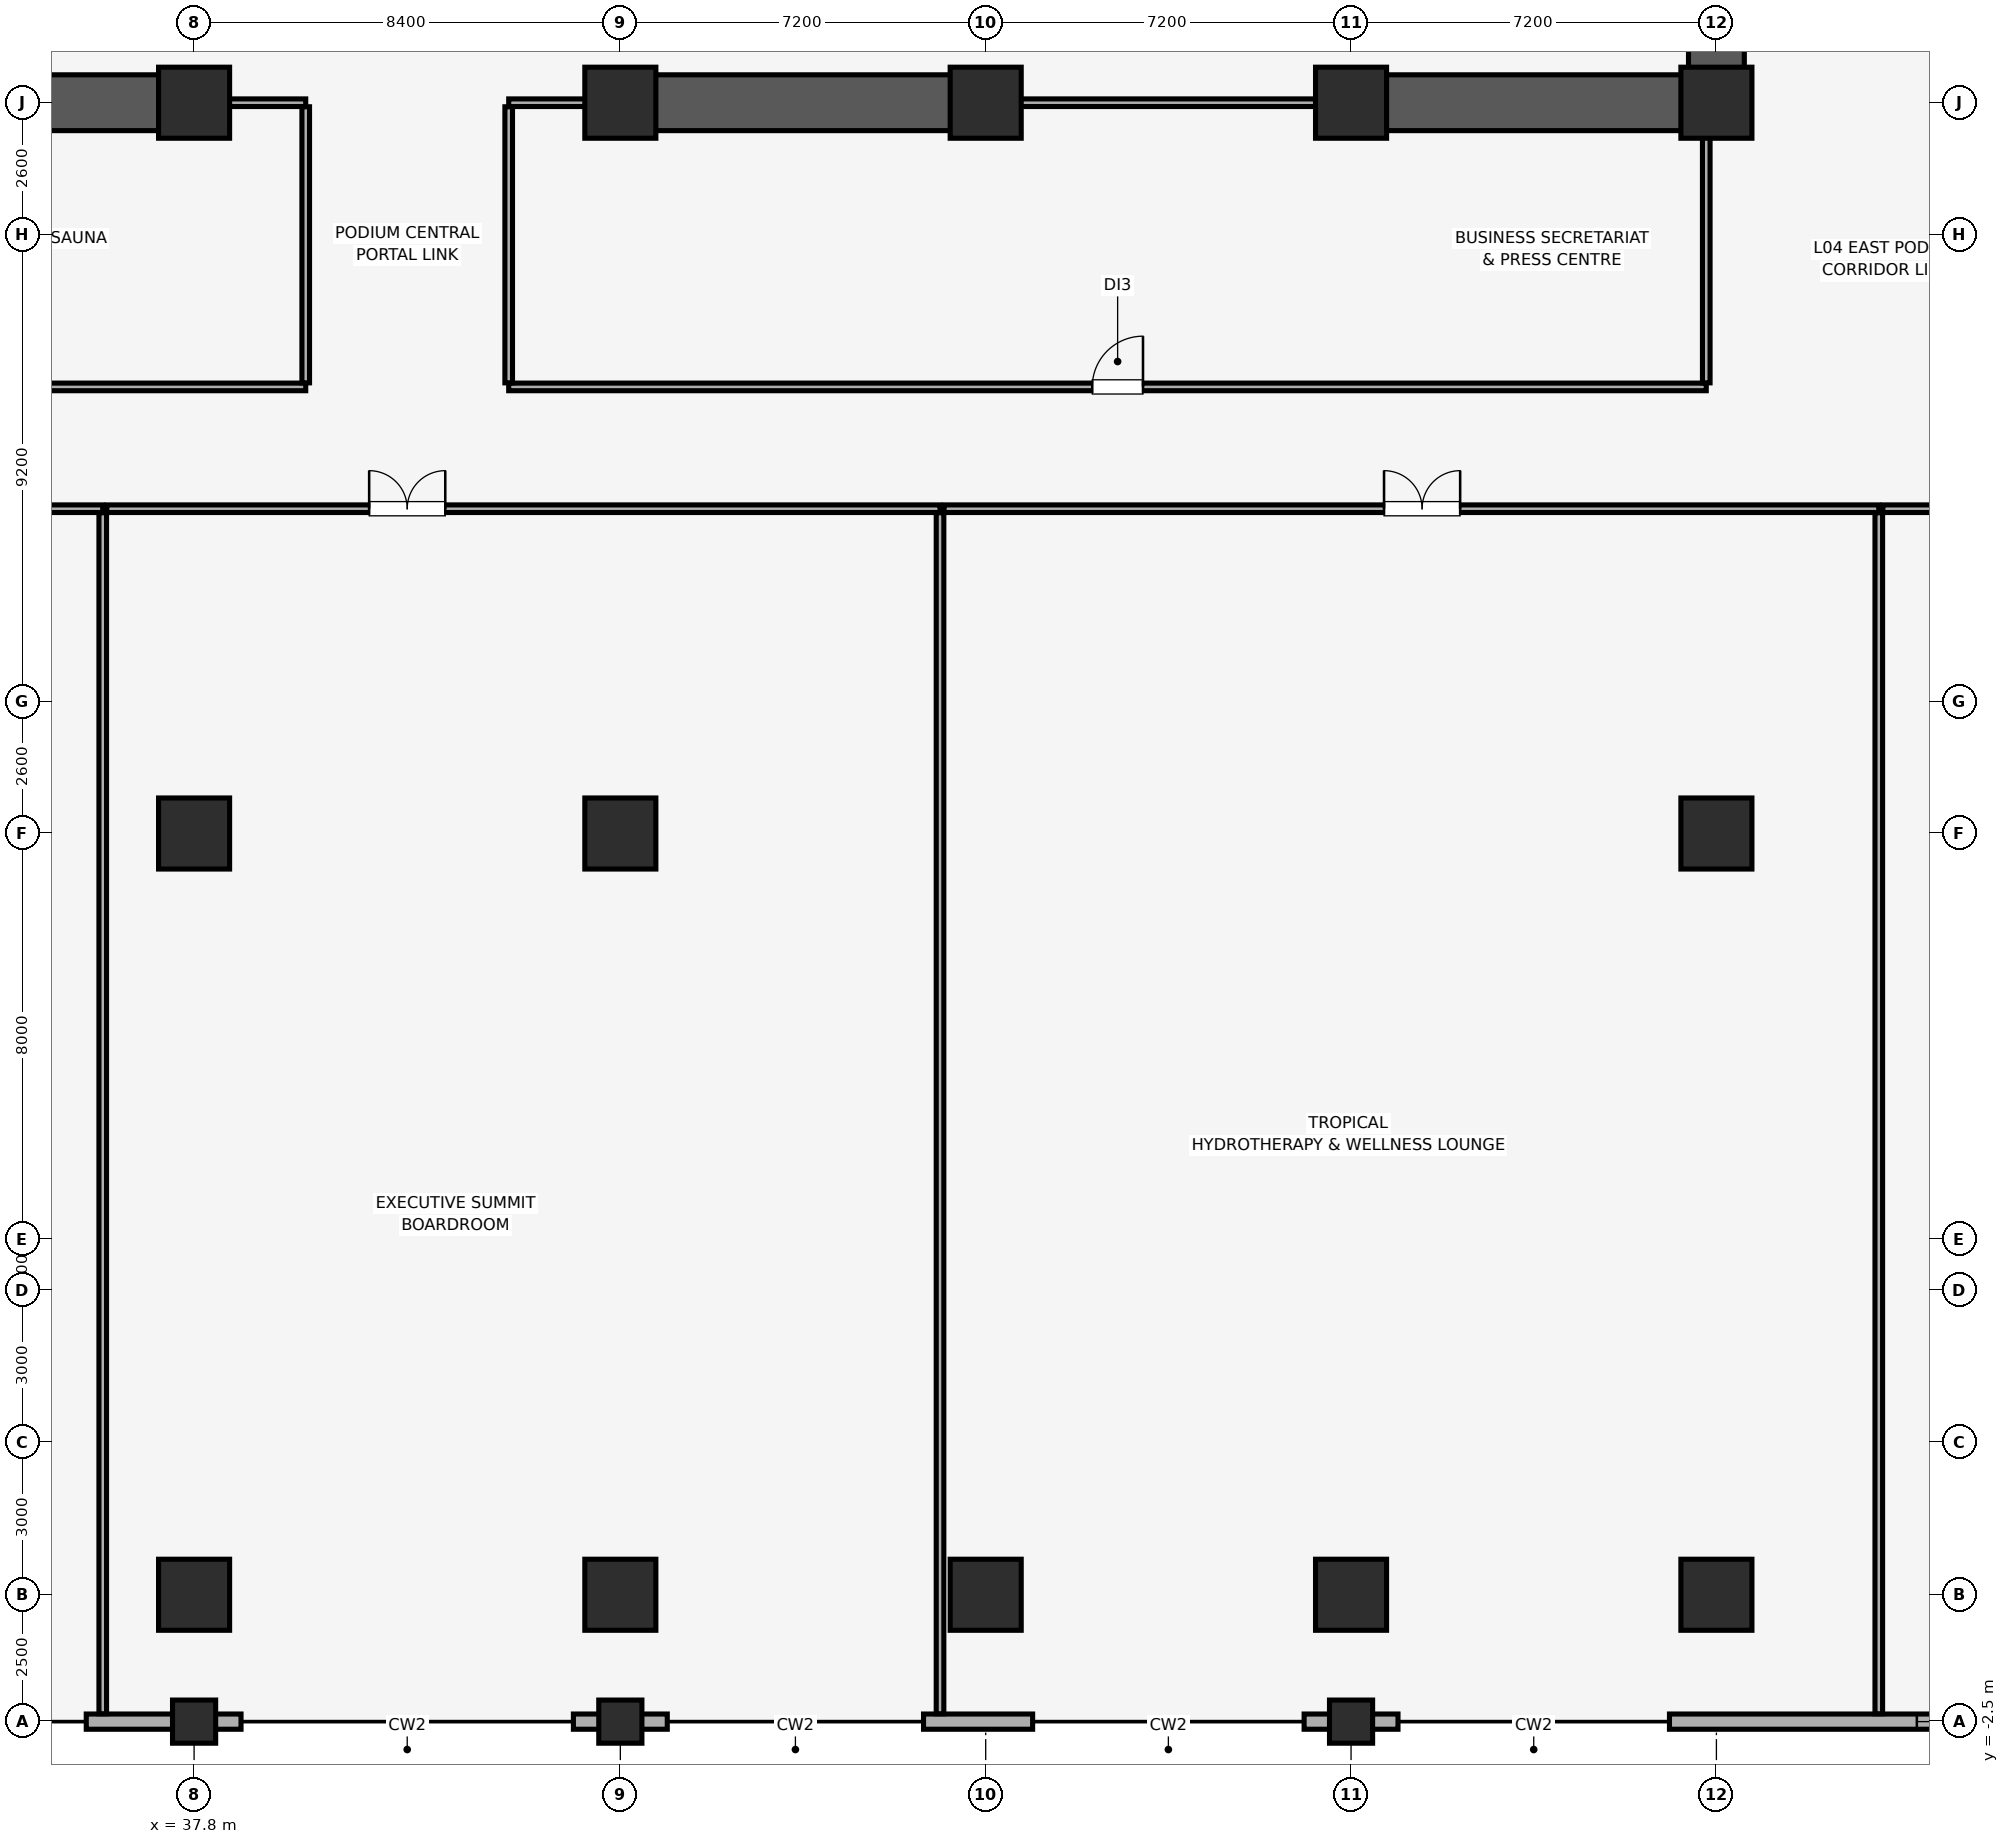
"""IFC4 building model, lengths in metres.
Left out: names, types, materials, properties, quantities, classifications, styles, units other than length and angle.
Written with IfcOpenShell. Run it as: python <this file> out.ifc"""

import sys

from ifc_helpers import new_model, si_unit, direction, frame, frame_2d, origin, origin_2d, place, context, subcontext, project, spatial, rectangle, extrude, element, fill, save


model = new_model("IFC4")
c1 = context("Model", 3, precision=1e-05, world=origin(), true_north=direction((0.0, 1.0)))
c2 = subcontext(c1, "Body", "Model", "MODEL_VIEW")
j1 = project(units=[si_unit("LENGTHUNIT", "METRE"), si_unit("PLANEANGLEUNIT", "RADIAN")], contexts=[c1])
p1 = place(None, origin())
s1 = spatial("IfcSite", under=j1, at=p1, CompositionType="ELEMENT")
p2 = place(p1, origin())
s2 = spatial("IfcBuilding", under=s1, at=p2, CompositionType="ELEMENT")
p3 = place(p2, frame((0.0, 0.0, 26.0)))
s3 = spatial("IfcBuildingStorey", under=s2, at=p3, CompositionType="ELEMENT", Elevation=26.0)
for number, where, z_axis, x_axis in (
    (1, (37.8, -2.5, 0.0), (0.0, 0.0, 1.0), (1.0, 0.0, 0.0)),
    (2, (46.2, -2.5, 0.0), (0.0, 0.0, 1.0), (1.0, 0.0, 0.0)),
    (3, (60.6, -2.5, 0.0), (0.0, 0.0, 1.0), (1.0, 0.0, 0.0)),
):
    element("IfcColumn", number, at=place(p3, frame(where, z_axis=z_axis, x_axis=x_axis)), inside=s3, PredefinedType="COLUMN", context=c2, shape_type="SweptSolid", body=[
        extrude(rectangle(XDim=0.85, YDim=0.85, at=origin_2d()), origin(), (0.0, 0.0, 1.0), 5.16),
    ])
for number, where, z_axis, x_axis in (
    (4, (37.8, 0.0, 0.0), (0.0, 0.0, 1.0), (1.0, 0.0, 0.0)),
    (5, (37.8, 29.4, 0.0), (0.0, 0.0, 1.0), (1.0, 0.0, 0.0)),
    (6, (46.2, 0.0, 0.0), (0.0, 0.0, 1.0), (1.0, 0.0, 0.0)),
    (7, (46.2, 29.4, 0.0), (0.0, 0.0, 1.0), (1.0, 0.0, 0.0)),
    (8, (53.4, 0.0, 0.0), (0.0, 0.0, 1.0), (1.0, 0.0, 0.0)),
    (9, (53.4, 29.4, 0.0), (0.0, 0.0, 1.0), (1.0, 0.0, 0.0)),
    (10, (60.6, 0.0, 0.0), (0.0, 0.0, 1.0), (1.0, 0.0, 0.0)),
    (11, (60.6, 29.4, 0.0), (0.0, 0.0, 1.0), (1.0, 0.0, 0.0)),
    (12, (67.8, 0.0, 0.0), (0.0, 0.0, 1.0), (1.0, 0.0, 0.0)),
    (13, (67.8, 29.4, 0.0), (0.0, 0.0, 1.0), (1.0, 0.0, 0.0)),
    (14, (37.8, 15.0, 0.0), (0.0, 0.0, 1.0), (1.0, 0.0, 0.0)),
    (15, (46.2, 15.0, 0.0), (0.0, 0.0, 1.0), (1.0, 0.0, 0.0)),
    (16, (67.8, 15.0, 0.0), (0.0, 0.0, 1.0), (1.0, 0.0, 0.0)),
):
    element("IfcColumn", number, at=place(p3, frame(where, z_axis=z_axis, x_axis=x_axis)), inside=s3, PredefinedType="COLUMN", context=c2, shape_type="SweptSolid", body=[
        extrude(rectangle(XDim=1.4, YDim=1.4, at=origin_2d()), origin(), (0.0, 0.0, 1.0), 5.16),
    ])
p4 = place(p3, frame((35.675, -2.5, 0.0), z_axis=(0.0, 0.0, 1.0), x_axis=(1.0, 0.0, 0.0)))
e17 = element("IfcWall", 17, at=p4, inside=s3, PredefinedType="SOLIDWALL", context=c2, shape_type="SweptSolid", body=[
    extrude(rectangle(XDim=3.05, YDim=0.3, at=frame_2d((1.525, 0.0))), origin(), (0.0, 0.0, 1.0), 5.12),
])
p5 = place(p3, frame((45.275, -2.5, 0.0), z_axis=(0.0, 0.0, 1.0), x_axis=(1.0, 0.0, 0.0)))
e18 = element("IfcWall", 18, at=p5, inside=s3, PredefinedType="SOLIDWALL", context=c2, shape_type="SweptSolid", body=[
    extrude(rectangle(XDim=1.85, YDim=0.3, at=frame_2d((0.925, 0.0))), origin(), (0.0, 0.0, 1.0), 5.12),
])
p6 = place(p3, frame((52.175, -2.5, 0.0), z_axis=(0.0, 0.0, 1.0), x_axis=(1.0, 0.0, 0.0)))
e19 = element("IfcWall", 19, at=p6, inside=s3, PredefinedType="SOLIDWALL", context=c2, shape_type="SweptSolid", body=[
    extrude(rectangle(XDim=2.15, YDim=0.3, at=frame_2d((1.075, 0.0))), origin(), (0.0, 0.0, 1.0), 5.12),
])
p7 = place(p3, frame((59.675, -2.5, 0.0), z_axis=(0.0, 0.0, 1.0), x_axis=(1.0, 0.0, 0.0)))
e20 = element("IfcWall", 20, at=p7, inside=s3, PredefinedType="SOLIDWALL", context=c2, shape_type="SweptSolid", body=[
    extrude(rectangle(XDim=1.85, YDim=0.3, at=frame_2d((0.925, 0.0))), origin(), (0.0, 0.0, 1.0), 5.12),
])
p8 = place(p3, frame((66.875, -2.5, 0.0), z_axis=(0.0, 0.0, 1.0), x_axis=(1.0, 0.0, 0.0)))
e21 = element("IfcWall", 21, at=p8, inside=s3, PredefinedType="SOLIDWALL", context=c2, shape_type="SweptSolid", body=[
    extrude(rectangle(XDim=16.725, YDim=0.3, at=frame_2d((8.363, 0.0))), origin(), (0.0, 0.0, 1.0), 5.12),
])
p9 = place(p8, frame((4.875, 0.0, 0.85)))
e22 = element("IfcOpeningElement", 22, at=p9, cuts=e21, PredefinedType="OPENING", context=c2, shape_type="SweptSolid", body=[
    extrude(rectangle(XDim=2.1, YDim=1.6, at=frame_2d((1.05, 0.8))), frame((0.0, 0.16, 0.0), z_axis=(0.0, -1.0, 0.0), x_axis=(1.0, 0.0, 0.0)), (0.0, 0.0, 1.0), 0.32),
])
p10 = place(p8, frame((10.65, 0.0, 0.85)))
e23 = element("IfcOpeningElement", 23, at=p10, cuts=e21, PredefinedType="OPENING", context=c2, shape_type="SweptSolid", body=[
    extrude(rectangle(XDim=3.8, YDim=2.2, at=frame_2d((1.9, 1.1))), frame((0.0, 0.16, 0.0), z_axis=(0.0, -1.0, 0.0), x_axis=(1.0, 0.0, 0.0)), (0.0, 0.0, 1.0), 0.32),
])
p11 = place(p3, frame((67.8, 29.4, 0.0), z_axis=(0.0, 0.0, 1.0), x_axis=(0.0, 1.0, 0.0)))
e24 = element("IfcWall", 24, at=p11, inside=s3, PredefinedType="SHEAR", context=c2, shape_type="SweptSolid", body=[
    extrude(rectangle(XDim=19.2, YDim=1.1, at=frame_2d((9.6, 0.0))), origin(), (0.0, 0.0, 1.0), 5.12),
])
for number, where, z_axis, x_axis in (
    (25, (30.4, 29.4, 0.0), (0.0, 0.0, 1.0), (1.0, 0.0, 0.0)),
    (26, (46.0, 29.4, 0.0), (0.0, 0.0, 1.0), (1.0, 0.0, 0.0)),
):
    element("IfcWall", number, at=place(p3, frame(where, z_axis=z_axis, x_axis=x_axis)), inside=s3, PredefinedType="SHEAR", context=c2, shape_type="SweptSolid", body=[
        extrude(rectangle(XDim=7.6, YDim=1.1, at=frame_2d((3.8, 0.0))), origin(), (0.0, 0.0, 1.0), 5.12),
    ])
p12 = place(p3, frame((60.4, 29.4, 0.0), z_axis=(0.0, 0.0, 1.0), x_axis=(1.0, 0.0, 0.0)))
e27 = element("IfcWall", 27, at=p12, inside=s3, PredefinedType="SHEAR", context=c2, shape_type="SweptSolid", body=[
    extrude(rectangle(XDim=6.845, YDim=1.1, at=frame_2d((3.423, 0.0))), origin(), (0.0, 0.0, 1.0), 5.12),
])
p13 = place(p3, frame((19.58, 21.4, 0.0), z_axis=(0.0, 0.0, 1.0), x_axis=(1.0, 0.0, 0.0)))
e28 = element("IfcWall", 28, at=p13, inside=s3, PredefinedType="PARTITIONING", context=c2, shape_type="SweptSolid", body=[
    extrude(rectangle(XDim=16.42, YDim=0.15, at=frame_2d((8.21, 0.0))), origin(), (0.0, 0.0, 1.0), 5.12),
])
p14 = place(p13, frame((6.67, 0.0, 0.0)))
e29 = element("IfcOpeningElement", 29, at=p14, cuts=e28, PredefinedType="OPENING", context=c2, shape_type="SweptSolid", body=[
    extrude(rectangle(XDim=1.5, YDim=2.25, at=frame_2d((0.75, 1.125))), frame((0.0, 0.085, 0.0), z_axis=(0.0, -1.0, 0.0), x_axis=(1.0, 0.0, 0.0)), (0.0, 0.0, 1.0), 0.17),
])
p15 = place(p3, frame((36.0, -2.345, 0.0), z_axis=(0.0, 0.0, 1.0), x_axis=(0.0, 1.0, 0.0)))
e30 = element("IfcWall", 30, at=p15, inside=s3, PredefinedType="PARTITIONING", context=c2, shape_type="SweptSolid", body=[
    extrude(rectangle(XDim=23.665, YDim=0.15, at=frame_2d((11.833, 0.0))), origin(), (0.0, 0.0, 1.0), 5.12),
])
p16 = place(p3, frame((36.08, 21.4, 0.0), z_axis=(0.0, 0.0, 1.0), x_axis=(1.0, 0.0, 0.0)))
e31 = element("IfcWall", 31, at=p16, inside=s3, PredefinedType="PARTITIONING", context=c2, shape_type="SweptSolid", body=[
    extrude(rectangle(XDim=16.42, YDim=0.15, at=frame_2d((8.21, 0.0))), origin(), (0.0, 0.0, 1.0), 5.12),
])
p17 = place(p16, frame((5.17, 0.0, 0.0)))
e32 = element("IfcOpeningElement", 32, at=p17, cuts=e31, PredefinedType="OPENING", context=c2, shape_type="SweptSolid", body=[
    extrude(rectangle(XDim=1.5, YDim=2.25, at=frame_2d((0.75, 1.125))), frame((0.0, 0.085, 0.0), z_axis=(0.0, -1.0, 0.0), x_axis=(1.0, 0.0, 0.0)), (0.0, 0.0, 1.0), 0.17),
])
p18 = place(p3, frame((52.5, -2.345, 0.0), z_axis=(0.0, 0.0, 1.0), x_axis=(0.0, 1.0, 0.0)))
e33 = element("IfcWall", 33, at=p18, inside=s3, PredefinedType="PARTITIONING", context=c2, shape_type="SweptSolid", body=[
    extrude(rectangle(XDim=23.665, YDim=0.15, at=frame_2d((11.833, 0.0))), origin(), (0.0, 0.0, 1.0), 5.12),
])
p19 = place(p3, frame((52.58, 21.4, 0.0), z_axis=(0.0, 0.0, 1.0), x_axis=(1.0, 0.0, 0.0)))
e34 = element("IfcWall", 34, at=p19, inside=s3, PredefinedType="PARTITIONING", context=c2, shape_type="SweptSolid", body=[
    extrude(rectangle(XDim=18.42, YDim=0.15, at=frame_2d((9.21, 0.0))), origin(), (0.0, 0.0, 1.0), 5.12),
])
p20 = place(p19, frame((8.67, 0.0, 0.0)))
e35 = element("IfcOpeningElement", 35, at=p20, cuts=e34, PredefinedType="OPENING", context=c2, shape_type="SweptSolid", body=[
    extrude(rectangle(XDim=1.5, YDim=2.25, at=frame_2d((0.75, 1.125))), frame((0.0, 0.085, 0.0), z_axis=(0.0, -1.0, 0.0), x_axis=(1.0, 0.0, 0.0)), (0.0, 0.0, 1.0), 0.17),
])
p21 = place(p3, frame((71.0, -2.345, 0.0), z_axis=(0.0, 0.0, 1.0), x_axis=(0.0, 1.0, 0.0)))
e36 = element("IfcWall", 36, at=p21, inside=s3, PredefinedType="PARTITIONING", context=c2, shape_type="SweptSolid", body=[
    extrude(rectangle(XDim=23.665, YDim=0.15, at=frame_2d((11.833, 0.0))), origin(), (0.0, 0.0, 1.0), 5.12),
])
p22 = place(p3, frame((71.08, 21.4, 0.0), z_axis=(0.0, 0.0, 1.0), x_axis=(1.0, 0.0, 0.0)))
e37 = element("IfcWall", 37, at=p22, inside=s3, PredefinedType="PARTITIONING", context=c2, shape_type="SweptSolid", body=[
    extrude(rectangle(XDim=15.965, YDim=0.15, at=frame_2d((7.982, 0.0))), origin(), (0.0, 0.0, 1.0), 5.12),
])
p23 = place(p22, frame((8.17, 0.0, 0.0)))
e38 = element("IfcOpeningElement", 38, at=p23, cuts=e37, PredefinedType="OPENING", context=c2, shape_type="SweptSolid", body=[
    extrude(rectangle(XDim=1.5, YDim=2.25, at=frame_2d((0.75, 1.125))), frame((0.0, 0.085, 0.0), z_axis=(0.0, -1.0, 0.0), x_axis=(1.0, 0.0, 0.0)), (0.0, 0.0, 1.0), 0.17),
])
p24 = place(p3, frame((16.4, 23.8, 0.0), z_axis=(0.0, 0.0, 1.0), x_axis=(1.0, 0.0, 0.0)))
e39 = element("IfcWall", 39, at=p24, inside=s3, PredefinedType="PARTITIONING", context=c2, shape_type="SweptSolid", body=[
    extrude(rectangle(XDim=23.6, YDim=0.15, at=frame_2d((11.8, 0.0))), origin(), (0.0, 0.0, 1.0), 5.12),
])
p25 = place(p24, frame((10.1, 0.0, 0.0)))
e40 = element("IfcOpeningElement", 40, at=p25, cuts=e39, PredefinedType="OPENING", context=c2, shape_type="SweptSolid", body=[
    extrude(rectangle(XDim=1.0, YDim=2.15, at=frame_2d((0.5, 1.075))), frame((0.0, 0.085, 0.0), z_axis=(0.0, -1.0, 0.0), x_axis=(1.0, 0.0, 0.0)), (0.0, 0.0, 1.0), 0.17),
])
p26 = place(p3, frame((38.01, 29.4, 0.0), z_axis=(0.0, 0.0, 1.0), x_axis=(1.0, 0.0, 0.0)))
e41 = element("IfcWall", 41, at=p26, inside=s3, PredefinedType="PARTITIONING", context=c2, shape_type="SweptSolid", body=[
    extrude(rectangle(XDim=1.99, YDim=0.15, at=frame_2d((0.995, 0.0))), origin(), (0.0, 0.0, 1.0), 4.06),
])
p27 = place(p3, frame((40.0, 23.88, 0.0), z_axis=(0.0, 0.0, 1.0), x_axis=(0.0, 1.0, 0.0)))
e42 = element("IfcWall", 42, at=p27, inside=s3, PredefinedType="PARTITIONING", context=c2, shape_type="SweptSolid", body=[
    extrude(rectangle(XDim=5.44, YDim=0.15, at=frame_2d((2.72, 0.0))), origin(), (0.0, 0.0, 1.0), 5.12),
])
p28 = place(p3, frame((44.0, 23.8, 0.0), z_axis=(0.0, 0.0, 1.0), x_axis=(1.0, 0.0, 0.0)))
e43 = element("IfcWall", 43, at=p28, inside=s3, PredefinedType="PARTITIONING", context=c2, shape_type="SweptSolid", body=[
    extrude(rectangle(XDim=23.6, YDim=0.15, at=frame_2d((11.8, 0.0))), origin(), (0.0, 0.0, 1.0), 5.12),
])
p29 = place(p28, frame((11.5, 0.0, 0.0)))
e44 = element("IfcOpeningElement", 44, at=p29, cuts=e43, PredefinedType="OPENING", context=c2, shape_type="SweptSolid", body=[
    extrude(rectangle(XDim=1.0, YDim=2.15, at=frame_2d((0.5, 1.075))), frame((0.0, 0.085, 0.0), z_axis=(0.0, -1.0, 0.0), x_axis=(1.0, 0.0, 0.0)), (0.0, 0.0, 1.0), 0.17),
])
p30 = place(p3, frame((44.0, 29.4, 0.0), z_axis=(0.0, 0.0, 1.0), x_axis=(1.0, 0.0, 0.0)))
e45 = element("IfcWall", 45, at=p30, inside=s3, PredefinedType="PARTITIONING", context=c2, shape_type="SweptSolid", body=[
    extrude(rectangle(XDim=1.99, YDim=0.15, at=frame_2d((0.995, 0.0))), origin(), (0.0, 0.0, 1.0), 4.06),
])
p31 = place(p3, frame((53.61, 29.4, 0.0), z_axis=(0.0, 0.0, 1.0), x_axis=(1.0, 0.0, 0.0)))
e46 = element("IfcWall", 46, at=p31, inside=s3, PredefinedType="PARTITIONING", context=c2, shape_type="SweptSolid", body=[
    extrude(rectangle(XDim=6.78, YDim=0.15, at=frame_2d((3.39, 0.0))), origin(), (0.0, 0.0, 1.0), 4.06),
])
p32 = place(p3, frame((44.0, 23.88, 0.0), z_axis=(0.0, 0.0, 1.0), x_axis=(0.0, 1.0, 0.0)))
e47 = element("IfcWall", 47, at=p32, inside=s3, PredefinedType="PARTITIONING", context=c2, shape_type="SweptSolid", body=[
    extrude(rectangle(XDim=5.44, YDim=0.15, at=frame_2d((2.72, 0.0))), origin(), (0.0, 0.0, 1.0), 5.12),
])
p33 = place(p3, frame((67.6, 23.88, 0.0), z_axis=(0.0, 0.0, 1.0), x_axis=(0.0, 1.0, 0.0)))
e48 = element("IfcWall", 48, at=p33, inside=s3, PredefinedType="PARTITIONING", context=c2, shape_type="SweptSolid", body=[
    extrude(rectangle(XDim=5.51, YDim=0.15, at=frame_2d((2.755, 0.0))), origin(), (0.0, 0.0, 1.0), 4.627),
])
p34 = place(p9, origin())
e49 = element("IfcWindow", 49, at=p34, inside=s3, PartitioningType="SINGLE_PANEL", PredefinedType="WINDOW", context=c2, shape_type="SweptSolid", body=[
    extrude(rectangle(XDim=2.1, YDim=1.6, at=frame_2d((1.05, 0.8))), frame((0.0, 0.03, 0.0), z_axis=(0.0, -1.0, 0.0), x_axis=(1.0, 0.0, 0.0)), (0.0, 0.0, 1.0), 0.06),
])
fill(e22, e49)
p35 = place(p17, origin())
e50 = element("IfcDoor", 50, at=p35, inside=s3, OperationType="DOUBLE_DOOR_SINGLE_SWING", PredefinedType="DOOR", context=c2, shape_type="SweptSolid", body=[
    extrude(rectangle(XDim=1.5, YDim=2.25, at=frame_2d((0.75, 1.125))), frame((0.0, 0.025, 0.0), z_axis=(0.0, -1.0, 0.0), x_axis=(1.0, 0.0, 0.0)), (0.0, 0.0, 1.0), 0.05),
])
fill(e32, e50)
p36 = place(p20, origin())
e51 = element("IfcDoor", 51, at=p36, inside=s3, OperationType="DOUBLE_DOOR_SINGLE_SWING", PredefinedType="DOOR", context=c2, shape_type="SweptSolid", body=[
    extrude(rectangle(XDim=1.5, YDim=2.25, at=frame_2d((0.75, 1.125))), frame((0.0, 0.025, 0.0), z_axis=(0.0, -1.0, 0.0), x_axis=(1.0, 0.0, 0.0)), (0.0, 0.0, 1.0), 0.05),
])
fill(e35, e51)
p37 = place(p29, origin())
e52 = element("IfcDoor", 52, at=p37, inside=s3, OperationType="SINGLE_SWING_RIGHT", PredefinedType="DOOR", context=c2, shape_type="SweptSolid", body=[
    extrude(rectangle(XDim=1.0, YDim=2.15, at=frame_2d((0.5, 1.075))), frame((0.0, 0.025, 0.0), z_axis=(0.0, -1.0, 0.0), x_axis=(1.0, 0.0, 0.0)), (0.0, 0.0, 1.0), 0.05),
])
fill(e44, e52)
save(model, sys.argv[1])
